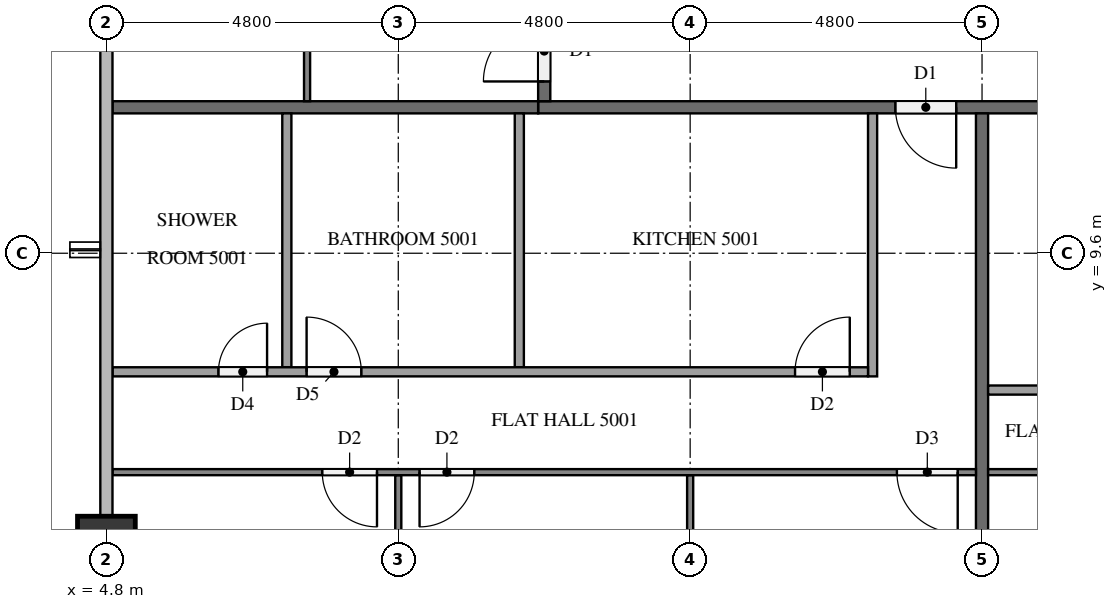
"""IFC4 building model, lengths in metres.
Left out: names, types, materials, properties, quantities, classifications, styles, units other than length and angle.
Written with IfcOpenShell. Run it as: python <this file> out.ifc"""

import sys

from ifc_helpers import new_model, si_unit, direction, frame, frame_2d, origin, origin_2d, place, context, subcontext, project, spatial, rectangle, extrude, element, fill, save


model = new_model("IFC4")
c1 = context("Model", 3, precision=1e-05, world=origin(), true_north=direction((0.0, 1.0)))
c2 = subcontext(c1, "Body", "Model", "MODEL_VIEW")
j1 = project(units=[si_unit("LENGTHUNIT", "METRE"), si_unit("PLANEANGLEUNIT", "RADIAN")], contexts=[c1])
p1 = place(None, origin())
s1 = spatial("IfcSite", under=j1, at=p1, CompositionType="ELEMENT")
p2 = place(p1, origin())
s2 = spatial("IfcBuilding", under=s1, at=p2, CompositionType="ELEMENT")
p3 = place(p2, frame((0.0, 0.0, 192.9)))
s3 = spatial("IfcBuildingStorey", under=s2, at=p3, CompositionType="ELEMENT", Elevation=192.9)
p4 = place(p3, frame((4.8, 4.8, 0.0), z_axis=(0.0, 0.0, 1.0), x_axis=(1.0, 0.0, 0.0)))
e1 = element("IfcColumn", 1, at=p4, inside=s3, PredefinedType="COLUMN", context=c2, shape_type="SweptSolid", body=[
    extrude(rectangle(XDim=0.95, YDim=0.95, at=origin_2d()), origin(), (0.0, 0.0, 1.0), 3.2),
])
p5 = place(p3, frame((50.5, 12.0, 0.0), z_axis=(0.0, 0.0, 1.0), x_axis=(-1.0, 0.0, 0.0)))
e2 = element("IfcWall", 2, at=p5, inside=s3, PredefinedType="PARTITIONING", context=c2, shape_type="SweptSolid", body=[
    extrude(rectangle(XDim=38.6, YDim=0.2, at=frame_2d((19.3, 0.0))), origin(), (0.0, 0.0, 1.0), 3.2),
])
p6 = place(p5, frame((31.725, 0.0, 0.0)))
e3 = element("IfcOpeningElement", 3, at=p6, cuts=e2, PredefinedType="OPENING", context=c2, shape_type="SweptSolid", body=[
    extrude(rectangle(XDim=1.0, YDim=2.1, at=frame_2d((0.5, 1.05))), frame((0.0, 0.11, 0.0), z_axis=(0.0, -1.0, 0.0), x_axis=(1.0, 0.0, 0.0)), (0.0, 0.0, 1.0), 0.22),
])
p7 = place(p5, frame((19.725, 0.0, 0.0)))
e4 = element("IfcOpeningElement", 4, at=p7, cuts=e2, PredefinedType="OPENING", context=c2, shape_type="SweptSolid", body=[
    extrude(rectangle(XDim=1.0, YDim=2.1, at=frame_2d((0.5, 1.05))), frame((0.0, 0.11, 0.0), z_axis=(0.0, -1.0, 0.0), x_axis=(1.0, 0.0, 0.0)), (0.0, 0.0, 1.0), 0.22),
])
p8 = place(p5, frame((17.875, 0.0, 0.0)))
e5 = element("IfcOpeningElement", 5, at=p8, cuts=e2, PredefinedType="OPENING", context=c2, shape_type="SweptSolid", body=[
    extrude(rectangle(XDim=1.0, YDim=2.1, at=frame_2d((0.5, 1.05))), frame((0.0, 0.11, 0.0), z_axis=(0.0, -1.0, 0.0), x_axis=(1.0, 0.0, 0.0)), (0.0, 0.0, 1.0), 0.22),
])
p9 = place(p5, frame((3.475, 0.0, 0.0)))
e6 = element("IfcOpeningElement", 6, at=p9, cuts=e2, PredefinedType="OPENING", context=c2, shape_type="SweptSolid", body=[
    extrude(rectangle(XDim=1.0, YDim=2.1, at=frame_2d((0.5, 1.05))), frame((0.0, 0.11, 0.0), z_axis=(0.0, -1.0, 0.0), x_axis=(1.0, 0.0, 0.0)), (0.0, 0.0, 1.0), 0.22),
])
p10 = place(p3, frame((12.0, 12.1, 0.0), z_axis=(0.0, 0.0, 1.0), x_axis=(0.0, 1.0, 0.0)))
e7 = element("IfcWall", 7, at=p10, inside=s3, PredefinedType="PARTITIONING", context=c2, shape_type="SweptSolid", body=[
    extrude(rectangle(XDim=28.6, YDim=0.2, at=frame_2d((14.3, 0.0))), origin(), (0.0, 0.0, 1.0), 3.2),
])
p11 = place(p10, frame((27.275, 0.0, 0.0)))
e8 = element("IfcOpeningElement", 8, at=p11, cuts=e7, PredefinedType="OPENING", context=c2, shape_type="SweptSolid", body=[
    extrude(rectangle(XDim=1.0, YDim=2.1, at=frame_2d((0.5, 1.05))), frame((0.0, 0.11, 0.0), z_axis=(0.0, -1.0, 0.0), x_axis=(1.0, 0.0, 0.0)), (0.0, 0.0, 1.0), 0.22),
])
p12 = place(p10, frame((0.325, 0.0, 0.0)))
e9 = element("IfcOpeningElement", 9, at=p12, cuts=e7, PredefinedType="OPENING", context=c2, shape_type="SweptSolid", body=[
    extrude(rectangle(XDim=1.0, YDim=2.1, at=frame_2d((0.5, 1.05))), frame((0.0, 0.11, 0.0), z_axis=(0.0, -1.0, 0.0), x_axis=(1.0, 0.0, 0.0)), (0.0, 0.0, 1.0), 0.22),
])
p13 = place(p3, frame((19.2, 11.9, 0.0), z_axis=(0.0, 0.0, 1.0), x_axis=(0.0, -1.0, 0.0)))
e10 = element("IfcWall", 10, at=p13, inside=s3, PredefinedType="PARTITIONING", context=c2, shape_type="SweptSolid", body=[
    extrude(rectangle(XDim=11.575, YDim=0.2, at=frame_2d((5.788, 0.0))), origin(), (0.0, 0.0, 1.0), 3.2),
])
p14 = place(p3, frame((4.9, 12.0, 0.0), z_axis=(0.0, 0.0, 1.0), x_axis=(1.0, 0.0, 0.0)))
e11 = element("IfcWall", 11, at=p14, inside=s3, PredefinedType="PARTITIONING", context=c2, shape_type="SweptSolid", body=[
    extrude(rectangle(XDim=7.0, YDim=0.2, at=frame_2d((3.5, 0.0))), origin(), (0.0, 0.0, 1.0), 3.2),
])
p15 = place(p3, frame((14.4, 5.95, 0.0), z_axis=(0.0, 0.0, 1.0), x_axis=(0.0, -1.0, 0.0)))
e12 = element("IfcWall", 12, at=p15, inside=s3, PredefinedType="PARTITIONING", context=c2, shape_type="SweptSolid", body=[
    extrude(rectangle(XDim=5.85, YDim=0.1, at=frame_2d((2.925, 0.0))), origin(), (0.0, 0.0, 1.0), 3.2),
])
p16 = place(p3, frame((9.6, 5.95, 0.0), z_axis=(0.0, 0.0, 1.0), x_axis=(0.0, -1.0, 0.0)))
e13 = element("IfcWall", 13, at=p16, inside=s3, PredefinedType="PARTITIONING", context=c2, shape_type="SweptSolid", body=[
    extrude(rectangle(XDim=5.475, YDim=0.1, at=frame_2d((2.737, 0.0))), origin(), (0.0, 0.0, 1.0), 3.2),
])
p17 = place(p3, frame((19.1, 6.0, 0.0), z_axis=(0.0, 0.0, 1.0), x_axis=(-1.0, 0.0, 0.0)))
e14 = element("IfcWall", 14, at=p17, inside=s3, PredefinedType="PARTITIONING", context=c2, shape_type="SweptSolid", body=[
    extrude(rectangle(XDim=14.2, YDim=0.1, at=frame_2d((7.1, 0.0))), origin(), (0.0, 0.0, 1.0), 3.2),
])
p18 = place(p17, frame((0.3, 0.0, 0.0)))
e15 = element("IfcOpeningElement", 15, at=p18, cuts=e14, PredefinedType="OPENING", context=c2, shape_type="SweptSolid", body=[
    extrude(rectangle(XDim=1.0, YDim=2.1, at=frame_2d((0.5, 1.05))), frame((0.0, 0.06, 0.0), z_axis=(0.0, -1.0, 0.0), x_axis=(1.0, 0.0, 0.0)), (0.0, 0.0, 1.0), 0.12),
])
p19 = place(p17, frame((8.25, 0.0, 0.0)))
e16 = element("IfcOpeningElement", 16, at=p19, cuts=e14, PredefinedType="OPENING", context=c2, shape_type="SweptSolid", body=[
    extrude(rectangle(XDim=0.9, YDim=2.1, at=frame_2d((0.45, 1.05))), frame((0.0, 0.06, 0.0), z_axis=(0.0, -1.0, 0.0), x_axis=(1.0, 0.0, 0.0)), (0.0, 0.0, 1.0), 0.12),
])
p20 = place(p17, frame((9.85, 0.0, 0.0)))
e17 = element("IfcOpeningElement", 17, at=p20, cuts=e14, PredefinedType="OPENING", context=c2, shape_type="SweptSolid", body=[
    extrude(rectangle(XDim=0.9, YDim=2.1, at=frame_2d((0.45, 1.05))), frame((0.0, 0.06, 0.0), z_axis=(0.0, -1.0, 0.0), x_axis=(1.0, 0.0, 0.0)), (0.0, 0.0, 1.0), 0.12),
])
for number, where, z_axis, x_axis in (
    (18, (11.59, 11.9, 0.0), (0.0, 0.0, 1.0), (0.0, -1.0, 0.0)),
    (19, (7.767, 11.9, 0.0), (0.0, 0.0, 1.0), (0.0, -1.0, 0.0)),
):
    element("IfcWall", number, at=place(p3, frame(where, z_axis=z_axis, x_axis=x_axis)), inside=s3, PredefinedType="PARTITIONING", context=c2, shape_type="SweptSolid", body=[
        extrude(rectangle(XDim=4.175, YDim=0.15, at=frame_2d((2.087, 0.0))), origin(), (0.0, 0.0, 1.0), 3.2),
    ])
p21 = place(p3, frame((17.4, 11.9, 0.0), z_axis=(0.0, 0.0, 1.0), x_axis=(0.0, -1.0, 0.0)))
e20 = element("IfcWall", 20, at=p21, inside=s3, PredefinedType="PARTITIONING", context=c2, shape_type="SweptSolid", body=[
    extrude(rectangle(XDim=4.325, YDim=0.15, at=frame_2d((2.163, 0.0))), origin(), (0.0, 0.0, 1.0), 3.2),
])
p22 = place(p3, frame((4.9, 7.65, 0.0), z_axis=(0.0, 0.0, 1.0), x_axis=(1.0, 0.0, 0.0)))
e21 = element("IfcWall", 21, at=p22, inside=s3, PredefinedType="PARTITIONING", context=c2, shape_type="SweptSolid", body=[
    extrude(rectangle(XDim=12.425, YDim=0.15, at=frame_2d((6.212, 0.0))), origin(), (0.0, 0.0, 1.0), 3.2),
])
p23 = place(p22, frame((11.225, 0.0, 0.0)))
e22 = element("IfcOpeningElement", 22, at=p23, cuts=e21, PredefinedType="OPENING", context=c2, shape_type="SweptSolid", body=[
    extrude(rectangle(XDim=0.9, YDim=2.1, at=frame_2d((0.45, 1.05))), frame((0.0, 0.085, 0.0), z_axis=(0.0, -1.0, 0.0), x_axis=(1.0, 0.0, 0.0)), (0.0, 0.0, 1.0), 0.17),
])
p24 = place(p22, frame((3.192, 0.0, 0.0)))
e23 = element("IfcOpeningElement", 23, at=p24, cuts=e21, PredefinedType="OPENING", context=c2, shape_type="SweptSolid", body=[
    extrude(rectangle(XDim=0.9, YDim=2.1, at=frame_2d((0.45, 1.05))), frame((0.0, 0.085, 0.0), z_axis=(0.0, -1.0, 0.0), x_axis=(1.0, 0.0, 0.0)), (0.0, 0.0, 1.0), 0.17),
])
p25 = place(p22, frame((1.742, 0.0, 0.0)))
e24 = element("IfcOpeningElement", 24, at=p25, cuts=e21, PredefinedType="OPENING", context=c2, shape_type="SweptSolid", body=[
    extrude(rectangle(XDim=0.8, YDim=2.1, at=frame_2d((0.4, 1.05))), frame((0.0, 0.085, 0.0), z_axis=(0.0, -1.0, 0.0), x_axis=(1.0, 0.0, 0.0)), (0.0, 0.0, 1.0), 0.17),
])
p26 = place(p3, frame((31.1, 6.0, 0.0), z_axis=(0.0, 0.0, 1.0), x_axis=(-1.0, 0.0, 0.0)))
e25 = element("IfcWall", 25, at=p26, inside=s3, PredefinedType="PARTITIONING", context=c2, shape_type="SweptSolid", body=[
    extrude(rectangle(XDim=11.8, YDim=0.1, at=frame_2d((5.9, 0.0))), origin(), (0.0, 0.0, 1.0), 3.2),
])
p27 = place(p26, frame((5.75, 0.0, 0.0)))
e26 = element("IfcOpeningElement", 26, at=p27, cuts=e25, PredefinedType="OPENING", context=c2, shape_type="SweptSolid", body=[
    extrude(rectangle(XDim=1.0, YDim=2.1, at=frame_2d((0.5, 1.05))), frame((0.0, 0.06, 0.0), z_axis=(0.0, -1.0, 0.0), x_axis=(1.0, 0.0, 0.0)), (0.0, 0.0, 1.0), 0.12),
])
p28 = place(p26, frame((7.45, 0.0, 0.0)))
e27 = element("IfcOpeningElement", 27, at=p28, cuts=e25, PredefinedType="OPENING", context=c2, shape_type="SweptSolid", body=[
    extrude(rectangle(XDim=0.9, YDim=2.1, at=frame_2d((0.45, 1.05))), frame((0.0, 0.06, 0.0), z_axis=(0.0, -1.0, 0.0), x_axis=(1.0, 0.0, 0.0)), (0.0, 0.0, 1.0), 0.12),
])
p29 = place(p3, frame((19.3, 7.35, 0.0), z_axis=(0.0, 0.0, 1.0), x_axis=(1.0, 0.0, 0.0)))
e28 = element("IfcWall", 28, at=p29, inside=s3, PredefinedType="PARTITIONING", context=c2, shape_type="SweptSolid", body=[
    extrude(rectangle(XDim=10.025, YDim=0.15, at=frame_2d((5.012, 0.0))), origin(), (0.0, 0.0, 1.0), 3.2),
])
p30 = place(p29, frame((6.34, 0.0, 0.0)))
e29 = element("IfcOpeningElement", 29, at=p30, cuts=e28, PredefinedType="OPENING", context=c2, shape_type="SweptSolid", body=[
    extrude(rectangle(XDim=0.8, YDim=2.1, at=frame_2d((0.4, 1.05))), frame((0.0, 0.085, 0.0), z_axis=(0.0, -1.0, 0.0), x_axis=(1.0, 0.0, 0.0)), (0.0, 0.0, 1.0), 0.17),
])
p31 = place(p29, frame((4.79, 0.0, 0.0)))
e30 = element("IfcOpeningElement", 30, at=p31, cuts=e28, PredefinedType="OPENING", context=c2, shape_type="SweptSolid", body=[
    extrude(rectangle(XDim=0.9, YDim=2.1, at=frame_2d((0.45, 1.05))), frame((0.0, 0.085, 0.0), z_axis=(0.0, -1.0, 0.0), x_axis=(1.0, 0.0, 0.0)), (0.0, 0.0, 1.0), 0.17),
])
p32 = place(p3, frame((8.1, 12.1, 0.0), z_axis=(0.0, 0.0, 1.0), x_axis=(0.0, 1.0, 0.0)))
e31 = element("IfcWall", 31, at=p32, inside=s3, PredefinedType="PARTITIONING", context=c2, shape_type="SweptSolid", body=[
    extrude(rectangle(XDim=14.2, YDim=0.1, at=frame_2d((7.1, 0.0))), origin(), (0.0, 0.0, 1.0), 3.2),
])
p33 = place(p32, frame((3.45, 0.0, 0.0)))
e32 = element("IfcOpeningElement", 32, at=p33, cuts=e31, PredefinedType="OPENING", context=c2, shape_type="SweptSolid", body=[
    extrude(rectangle(XDim=0.9, YDim=2.1, at=frame_2d((0.45, 1.05))), frame((0.0, 0.06, 0.0), z_axis=(0.0, -1.0, 0.0), x_axis=(1.0, 0.0, 0.0)), (0.0, 0.0, 1.0), 0.12),
])
p34 = place(p32, frame((5.05, 0.0, 0.0)))
e33 = element("IfcOpeningElement", 33, at=p34, cuts=e31, PredefinedType="OPENING", context=c2, shape_type="SweptSolid", body=[
    extrude(rectangle(XDim=1.0, YDim=2.1, at=frame_2d((0.5, 1.05))), frame((0.0, 0.06, 0.0), z_axis=(0.0, -1.0, 0.0), x_axis=(1.0, 0.0, 0.0)), (0.0, 0.0, 1.0), 0.12),
])
p35 = place(p32, frame((13.0, 0.0, 0.0)))
e34 = element("IfcOpeningElement", 34, at=p35, cuts=e31, PredefinedType="OPENING", context=c2, shape_type="SweptSolid", body=[
    extrude(rectangle(XDim=0.9, YDim=2.1, at=frame_2d((0.45, 1.05))), frame((0.0, 0.06, 0.0), z_axis=(0.0, -1.0, 0.0), x_axis=(1.0, 0.0, 0.0)), (0.0, 0.0, 1.0), 0.12),
])
p36 = place(p6, origin())
e35 = element("IfcDoor", 35, at=p36, inside=s3, OperationType="SINGLE_SWING_LEFT", PredefinedType="DOOR", context=c2, shape_type="SweptSolid", body=[
    extrude(rectangle(XDim=1.0, YDim=2.1, at=frame_2d((0.5, 1.05))), frame((0.0, 0.025, 0.0), z_axis=(0.0, -1.0, 0.0), x_axis=(1.0, 0.0, 0.0)), (0.0, 0.0, 1.0), 0.05),
])
fill(e3, e35)
p37 = place(p12, origin())
e36 = element("IfcDoor", 36, at=p37, inside=s3, OperationType="SINGLE_SWING_LEFT", PredefinedType="DOOR", context=c2, shape_type="SweptSolid", body=[
    extrude(rectangle(XDim=1.0, YDim=2.1, at=frame_2d((0.5, 1.05))), frame((0.0, 0.025, 0.0), z_axis=(0.0, -1.0, 0.0), x_axis=(1.0, 0.0, 0.0)), (0.0, 0.0, 1.0), 0.05),
])
fill(e9, e36)
p38 = place(p18, origin())
e37 = element("IfcDoor", 37, at=p38, inside=s3, OperationType="SINGLE_SWING_LEFT", PredefinedType="DOOR", context=c2, shape_type="SweptSolid", body=[
    extrude(rectangle(XDim=1.0, YDim=2.1, at=frame_2d((0.5, 1.05))), frame((0.0, 0.025, 0.0), z_axis=(0.0, -1.0, 0.0), x_axis=(1.0, 0.0, 0.0)), (0.0, 0.0, 1.0), 0.05),
])
fill(e15, e37)
p39 = place(p19, origin())
e38 = element("IfcDoor", 38, at=p39, inside=s3, OperationType="SINGLE_SWING_RIGHT", PredefinedType="DOOR", context=c2, shape_type="SweptSolid", body=[
    extrude(rectangle(XDim=0.9, YDim=2.1, at=frame_2d((0.45, 1.05))), frame((0.0, 0.025, 0.0), z_axis=(0.0, -1.0, 0.0), x_axis=(1.0, 0.0, 0.0)), (0.0, 0.0, 1.0), 0.05),
])
fill(e16, e38)
p40 = place(p20, origin())
e39 = element("IfcDoor", 39, at=p40, inside=s3, OperationType="SINGLE_SWING_LEFT", PredefinedType="DOOR", context=c2, shape_type="SweptSolid", body=[
    extrude(rectangle(XDim=0.9, YDim=2.1, at=frame_2d((0.45, 1.05))), frame((0.0, 0.025, 0.0), z_axis=(0.0, -1.0, 0.0), x_axis=(1.0, 0.0, 0.0)), (0.0, 0.0, 1.0), 0.05),
])
fill(e17, e39)
p41 = place(p23, origin())
e40 = element("IfcDoor", 40, at=p41, inside=s3, OperationType="SINGLE_SWING_RIGHT", PredefinedType="DOOR", context=c2, shape_type="SweptSolid", body=[
    extrude(rectangle(XDim=0.9, YDim=2.1, at=frame_2d((0.45, 1.05))), frame((0.0, 0.025, 0.0), z_axis=(0.0, -1.0, 0.0), x_axis=(1.0, 0.0, 0.0)), (0.0, 0.0, 1.0), 0.05),
])
fill(e22, e40)
p42 = place(p24, origin())
e41 = element("IfcDoor", 41, at=p42, inside=s3, OperationType="SINGLE_SWING_LEFT", PredefinedType="DOOR", context=c2, shape_type="SweptSolid", body=[
    extrude(rectangle(XDim=0.9, YDim=2.1, at=frame_2d((0.45, 1.05))), frame((0.0, 0.025, 0.0), z_axis=(0.0, -1.0, 0.0), x_axis=(1.0, 0.0, 0.0)), (0.0, 0.0, 1.0), 0.05),
])
fill(e23, e41)
p43 = place(p25, origin())
e42 = element("IfcDoor", 42, at=p43, inside=s3, OperationType="SINGLE_SWING_RIGHT", PredefinedType="DOOR", context=c2, shape_type="SweptSolid", body=[
    extrude(rectangle(XDim=0.8, YDim=2.1, at=frame_2d((0.4, 1.05))), frame((0.0, 0.025, 0.0), z_axis=(0.0, -1.0, 0.0), x_axis=(1.0, 0.0, 0.0)), (0.0, 0.0, 1.0), 0.05),
])
fill(e24, e42)
save(model, sys.argv[1])
